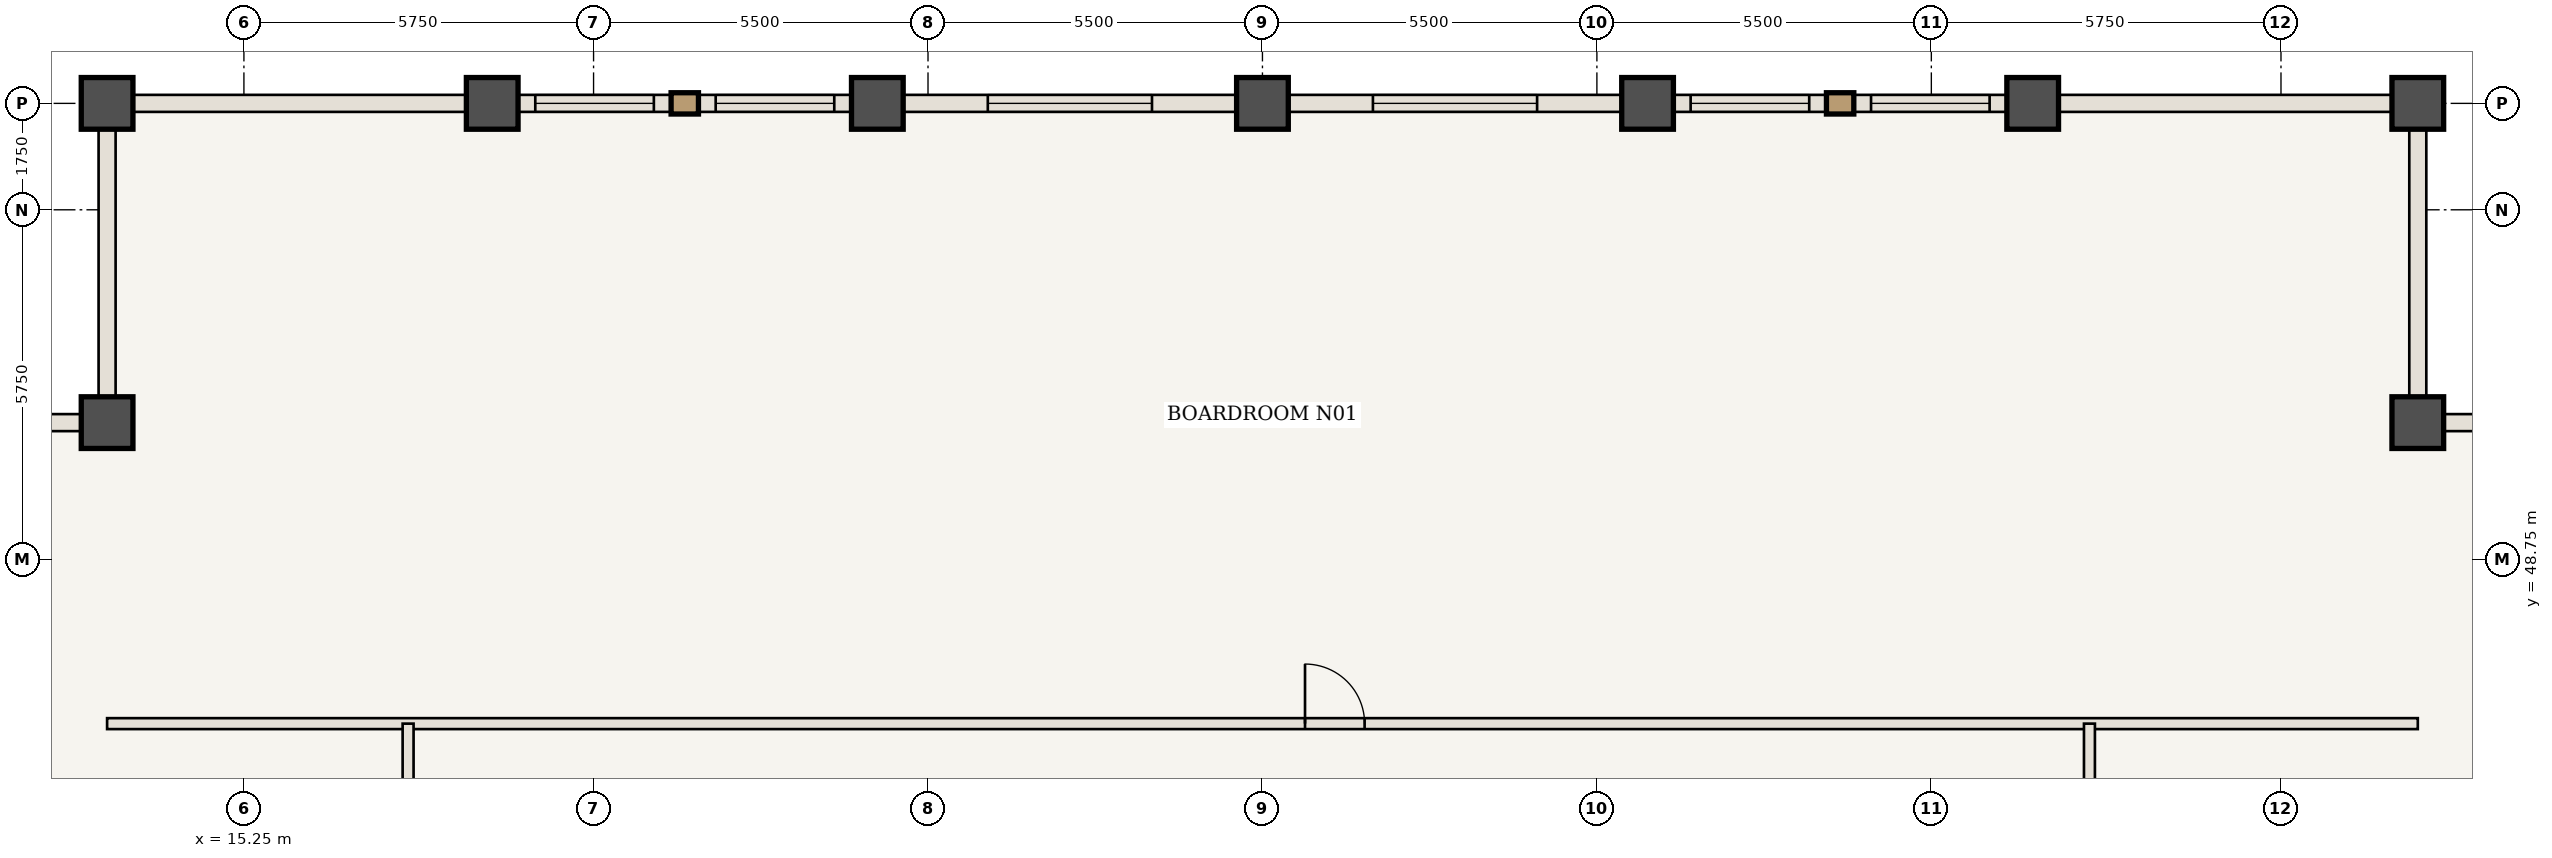
"""IFC4 building model, lengths in metres.
Left out: names, types, materials, properties, quantities, classifications, styles, units other than length and angle.
Written with IfcOpenShell. Run it as: python <this file> out.ifc"""

import sys

from ifc_helpers import new_model, si_unit, direction, frame, frame_2d, origin, origin_2d, place, context, subcontext, project, spatial, rectangle, extrude, element, fill, save


model = new_model("IFC4")
c1 = context("Model", 3, precision=1e-05, world=origin(), true_north=direction((0.0, 1.0)))
c2 = subcontext(c1, "Body", "Model", "MODEL_VIEW")
j1 = project(units=[si_unit("LENGTHUNIT", "METRE"), si_unit("PLANEANGLEUNIT", "RADIAN")], contexts=[c1])
p1 = place(None, origin())
s1 = spatial("IfcSite", under=j1, at=p1, CompositionType="ELEMENT")
p2 = place(p1, origin())
s2 = spatial("IfcBuilding", under=s1, at=p2, CompositionType="ELEMENT")
p3 = place(p2, frame((0.0, 0.0, 221.55)))
s3 = spatial("IfcBuildingStorey", under=s2, at=p3, CompositionType="ELEMENT", Elevation=221.55)
for number, where, z_axis, x_axis in (
    (1, (51.0, 51.0, 0.0), (0.0, 0.0, 1.0), (1.0, 0.0, 0.0)),
    (2, (51.0, 56.25, 0.0), (0.0, 0.0, 1.0), (1.0, 0.0, 0.0)),
    (3, (13.0, 56.25, 0.0), (0.0, 0.0, 1.0), (1.0, 0.0, 0.0)),
    (4, (13.0, 51.0, 0.0), (0.0, 0.0, 1.0), (1.0, 0.0, 0.0)),
    (5, (19.333, 56.25, 0.0), (0.0, 0.0, 1.0), (1.0, 0.0, 0.0)),
    (6, (25.667, 56.25, 0.0), (0.0, 0.0, 1.0), (1.0, 0.0, 0.0)),
    (7, (32.0, 56.25, 0.0), (0.0, 0.0, 1.0), (1.0, 0.0, 0.0)),
    (8, (38.333, 56.25, 0.0), (0.0, 0.0, 1.0), (1.0, 0.0, 0.0)),
    (9, (44.667, 56.25, 0.0), (0.0, 0.0, 1.0), (1.0, 0.0, 0.0)),
):
    element("IfcColumn", number, at=place(p3, frame(where, z_axis=z_axis, x_axis=x_axis)), inside=s3, PredefinedType="COLUMN", context=c2, shape_type="SweptSolid", body=[
        extrude(rectangle(XDim=0.85, YDim=0.85, at=origin_2d()), origin(), (0.0, 0.0, 1.0), 3.85),
    ])
p4 = place(p3, frame((13.0, 46.05, 0.0), z_axis=(0.0, 0.0, 1.0), x_axis=(1.0, 0.0, 0.0)))
e10 = element("IfcWall", 10, at=p4, inside=s3, PredefinedType="STANDARD", context=c2, shape_type="SweptSolid", body=[
    extrude(rectangle(XDim=38.0, YDim=0.18, at=frame_2d((19.0, 0.0))), origin(), (0.0, 0.0, 1.0), 3.685),
])
p5 = place(p4, frame((19.7, 0.0, 0.0)))
e11 = element("IfcOpeningElement", 11, at=p5, cuts=e10, PredefinedType="OPENING", context=c2, shape_type="SweptSolid", body=[
    extrude(rectangle(XDim=0.98, YDim=2.2, at=frame_2d((0.49, 1.1))), frame((0.0, 0.1, 0.0), z_axis=(0.0, -1.0, 0.0), x_axis=(1.0, 0.0, 0.0)), (0.0, 0.0, 1.0), 0.2),
])
p6 = place(p3, frame((17.95, 37.708, 0.0), z_axis=(0.0, 0.0, 1.0), x_axis=(0.0, 1.0, 0.0)))
e12 = element("IfcWall", 12, at=p6, inside=s3, PredefinedType="STANDARD", context=c2, shape_type="SweptSolid", body=[
    extrude(rectangle(XDim=8.342, YDim=0.18, at=frame_2d((4.171, 0.0))), origin(), (0.0, 0.0, 1.0), 3.685),
])
p7 = place(p6, frame((3.671, 0.0, 0.0)))
e13 = element("IfcOpeningElement", 13, at=p7, cuts=e12, PredefinedType="OPENING", context=c2, shape_type="SweptSolid", body=[
    extrude(rectangle(XDim=0.98, YDim=2.2, at=frame_2d((0.49, 1.1))), frame((0.0, 0.1, 0.0), z_axis=(0.0, -1.0, 0.0), x_axis=(1.0, 0.0, 0.0)), (0.0, 0.0, 1.0), 0.2),
])
p8 = place(p3, frame((45.6, 31.05, 0.0), z_axis=(0.0, 0.0, 1.0), x_axis=(0.0, 1.0, 0.0)))
e14 = element("IfcWall", 14, at=p8, inside=s3, PredefinedType="STANDARD", context=c2, shape_type="SweptSolid", body=[
    extrude(rectangle(XDim=15.0, YDim=0.18, at=frame_2d((7.5, 0.0))), origin(), (0.0, 0.0, 1.0), 3.685),
])
p9 = place(p8, frame((7.0, 0.0, 0.0)))
e15 = element("IfcOpeningElement", 15, at=p9, cuts=e14, PredefinedType="OPENING", context=c2, shape_type="SweptSolid", body=[
    extrude(rectangle(XDim=0.98, YDim=2.2, at=frame_2d((0.49, 1.1))), frame((0.0, 0.1, 0.0), z_axis=(0.0, -1.0, 0.0), x_axis=(1.0, 0.0, 0.0)), (0.0, 0.0, 1.0), 0.2),
])
p10 = place(p3, frame((13.0, 56.25, 0.0), z_axis=(0.0, 0.0, 1.0), x_axis=(1.0, 0.0, 0.0)))
e16 = element("IfcWall", 16, at=p10, inside=s3, PredefinedType="USERDEFINED", context=c2, shape_type="SweptSolid", body=[
    extrude(rectangle(XDim=6.333, YDim=0.28, at=frame_2d((3.167, 0.0))), origin(), (0.0, 0.0, 1.0), 2.985),
])
p11 = place(p3, frame((19.333, 56.25, 0.0), z_axis=(0.0, 0.0, 1.0), x_axis=(1.0, 0.0, 0.0)))
e17 = element("IfcWall", 17, at=p11, inside=s3, PredefinedType="USERDEFINED", context=c2, shape_type="SweptSolid", body=[
    extrude(rectangle(XDim=6.333, YDim=0.28, at=frame_2d((3.167, 0.0))), origin(), (0.0, 0.0, 1.0), 2.985),
])
p12 = place(p11, frame((0.708, 0.0, 0.85)))
e18 = element("IfcOpeningElement", 18, at=p12, cuts=e17, PredefinedType="OPENING", context=c2, shape_type="SweptSolid", body=[
    extrude(rectangle(XDim=1.95, YDim=1.935, at=frame_2d((0.975, 0.968))), frame((0.0, 0.15, 0.0), z_axis=(0.0, -1.0, 0.0), x_axis=(1.0, 0.0, 0.0)), (0.0, 0.0, 1.0), 0.3),
])
p13 = place(p11, frame((3.675, 0.0, 0.85)))
e19 = element("IfcOpeningElement", 19, at=p13, cuts=e17, PredefinedType="OPENING", context=c2, shape_type="SweptSolid", body=[
    extrude(rectangle(XDim=1.95, YDim=1.935, at=frame_2d((0.975, 0.968))), frame((0.0, 0.15, 0.0), z_axis=(0.0, -1.0, 0.0), x_axis=(1.0, 0.0, 0.0)), (0.0, 0.0, 1.0), 0.3),
])
p14 = place(p3, frame((25.667, 56.25, 0.0), z_axis=(0.0, 0.0, 1.0), x_axis=(1.0, 0.0, 0.0)))
e20 = element("IfcWall", 20, at=p14, inside=s3, PredefinedType="USERDEFINED", context=c2, shape_type="SweptSolid", body=[
    extrude(rectangle(XDim=6.333, YDim=0.28, at=frame_2d((3.167, 0.0))), origin(), (0.0, 0.0, 1.0), 2.985),
])
p15 = place(p14, frame((1.817, 0.0, 0.85)))
e21 = element("IfcOpeningElement", 21, at=p15, cuts=e20, PredefinedType="OPENING", context=c2, shape_type="SweptSolid", body=[
    extrude(rectangle(XDim=2.7, YDim=1.935, at=frame_2d((1.35, 0.968))), frame((0.0, 0.15, 0.0), z_axis=(0.0, -1.0, 0.0), x_axis=(1.0, 0.0, 0.0)), (0.0, 0.0, 1.0), 0.3),
])
p16 = place(p3, frame((32.0, 56.25, 0.0), z_axis=(0.0, 0.0, 1.0), x_axis=(1.0, 0.0, 0.0)))
e22 = element("IfcWall", 22, at=p16, inside=s3, PredefinedType="USERDEFINED", context=c2, shape_type="SweptSolid", body=[
    extrude(rectangle(XDim=6.333, YDim=0.28, at=frame_2d((3.167, 0.0))), origin(), (0.0, 0.0, 1.0), 2.985),
])
p17 = place(p16, frame((1.817, 0.0, 0.85)))
e23 = element("IfcOpeningElement", 23, at=p17, cuts=e22, PredefinedType="OPENING", context=c2, shape_type="SweptSolid", body=[
    extrude(rectangle(XDim=2.7, YDim=1.935, at=frame_2d((1.35, 0.968))), frame((0.0, 0.15, 0.0), z_axis=(0.0, -1.0, 0.0), x_axis=(1.0, 0.0, 0.0)), (0.0, 0.0, 1.0), 0.3),
])
p18 = place(p3, frame((38.333, 56.25, 0.0), z_axis=(0.0, 0.0, 1.0), x_axis=(1.0, 0.0, 0.0)))
e24 = element("IfcWall", 24, at=p18, inside=s3, PredefinedType="USERDEFINED", context=c2, shape_type="SweptSolid", body=[
    extrude(rectangle(XDim=6.333, YDim=0.28, at=frame_2d((3.167, 0.0))), origin(), (0.0, 0.0, 1.0), 2.985),
])
p19 = place(p18, frame((0.708, 0.0, 0.85)))
e25 = element("IfcOpeningElement", 25, at=p19, cuts=e24, PredefinedType="OPENING", context=c2, shape_type="SweptSolid", body=[
    extrude(rectangle(XDim=1.95, YDim=1.935, at=frame_2d((0.975, 0.968))), frame((0.0, 0.15, 0.0), z_axis=(0.0, -1.0, 0.0), x_axis=(1.0, 0.0, 0.0)), (0.0, 0.0, 1.0), 0.3),
])
p20 = place(p18, frame((3.675, 0.0, 0.85)))
e26 = element("IfcOpeningElement", 26, at=p20, cuts=e24, PredefinedType="OPENING", context=c2, shape_type="SweptSolid", body=[
    extrude(rectangle(XDim=1.95, YDim=1.935, at=frame_2d((0.975, 0.968))), frame((0.0, 0.15, 0.0), z_axis=(0.0, -1.0, 0.0), x_axis=(1.0, 0.0, 0.0)), (0.0, 0.0, 1.0), 0.3),
])
p21 = place(p3, frame((44.667, 56.25, 0.0), z_axis=(0.0, 0.0, 1.0), x_axis=(1.0, 0.0, 0.0)))
e27 = element("IfcWall", 27, at=p21, inside=s3, PredefinedType="USERDEFINED", context=c2, shape_type="SweptSolid", body=[
    extrude(rectangle(XDim=6.333, YDim=0.28, at=frame_2d((3.167, 0.0))), origin(), (0.0, 0.0, 1.0), 2.985),
])
for number, where, z_axis, x_axis in (
    (28, (51.0, 51.0, 0.0), (0.0, 0.0, 1.0), (1.0, 0.0, 0.0)),
    (29, (51.0, 56.25, 0.0), (0.0, 0.0, 1.0), (0.0, -1.0, 0.0)),
    (30, (13.0, 51.0, 0.0), (0.0, 0.0, 1.0), (0.0, 1.0, 0.0)),
    (31, (7.75, 51.0, 0.0), (0.0, 0.0, 1.0), (1.0, 0.0, 0.0)),
):
    element("IfcWall", number, at=place(p3, frame(where, z_axis=z_axis, x_axis=x_axis)), inside=s3, PredefinedType="USERDEFINED", context=c2, shape_type="SweptSolid", body=[
        extrude(rectangle(XDim=5.25, YDim=0.28, at=frame_2d((2.625, 0.0))), origin(), (0.0, 0.0, 1.0), 2.985),
    ])
p22 = place(p5, origin())
e32 = element("IfcDoor", 32, at=p22, inside=s3, OperationType="SINGLE_SWING_LEFT", PredefinedType="DOOR", context=c2, shape_type="SweptSolid", body=[
    extrude(rectangle(XDim=0.98, YDim=2.2, at=frame_2d((0.49, 1.1))), frame((0.0, 0.025, 0.0), z_axis=(0.0, -1.0, 0.0), x_axis=(1.0, 0.0, 0.0)), (0.0, 0.0, 1.0), 0.05),
])
fill(e11, e32)
p23 = place(p12, origin())
e33 = element("IfcWindow", 33, at=p23, inside=s3, PartitioningType="SINGLE_PANEL", PredefinedType="WINDOW", context=c2, shape_type="SweptSolid", body=[
    extrude(rectangle(XDim=1.95, YDim=1.935, at=frame_2d((0.975, 0.968))), frame((0.0, 0.03, 0.0), z_axis=(0.0, -1.0, 0.0), x_axis=(1.0, 0.0, 0.0)), (0.0, 0.0, 1.0), 0.06),
])
fill(e18, e33)
p24 = place(p13, origin())
e34 = element("IfcWindow", 34, at=p24, inside=s3, PartitioningType="SINGLE_PANEL", PredefinedType="WINDOW", context=c2, shape_type="SweptSolid", body=[
    extrude(rectangle(XDim=1.95, YDim=1.935, at=frame_2d((0.975, 0.968))), frame((0.0, 0.03, 0.0), z_axis=(0.0, -1.0, 0.0), x_axis=(1.0, 0.0, 0.0)), (0.0, 0.0, 1.0), 0.06),
])
fill(e19, e34)
p25 = place(p15, origin())
e35 = element("IfcWindow", 35, at=p25, inside=s3, PartitioningType="SINGLE_PANEL", PredefinedType="WINDOW", context=c2, shape_type="SweptSolid", body=[
    extrude(rectangle(XDim=2.7, YDim=1.935, at=frame_2d((1.35, 0.968))), frame((0.0, 0.03, 0.0), z_axis=(0.0, -1.0, 0.0), x_axis=(1.0, 0.0, 0.0)), (0.0, 0.0, 1.0), 0.06),
])
fill(e21, e35)
p26 = place(p17, origin())
e36 = element("IfcWindow", 36, at=p26, inside=s3, PartitioningType="SINGLE_PANEL", PredefinedType="WINDOW", context=c2, shape_type="SweptSolid", body=[
    extrude(rectangle(XDim=2.7, YDim=1.935, at=frame_2d((1.35, 0.968))), frame((0.0, 0.03, 0.0), z_axis=(0.0, -1.0, 0.0), x_axis=(1.0, 0.0, 0.0)), (0.0, 0.0, 1.0), 0.06),
])
fill(e23, e36)
p27 = place(p19, origin())
e37 = element("IfcWindow", 37, at=p27, inside=s3, PartitioningType="SINGLE_PANEL", PredefinedType="WINDOW", context=c2, shape_type="SweptSolid", body=[
    extrude(rectangle(XDim=1.95, YDim=1.935, at=frame_2d((0.975, 0.968))), frame((0.0, 0.03, 0.0), z_axis=(0.0, -1.0, 0.0), x_axis=(1.0, 0.0, 0.0)), (0.0, 0.0, 1.0), 0.06),
])
fill(e25, e37)
p28 = place(p20, origin())
e38 = element("IfcWindow", 38, at=p28, inside=s3, PartitioningType="SINGLE_PANEL", PredefinedType="WINDOW", context=c2, shape_type="SweptSolid", body=[
    extrude(rectangle(XDim=1.95, YDim=1.935, at=frame_2d((0.975, 0.968))), frame((0.0, 0.03, 0.0), z_axis=(0.0, -1.0, 0.0), x_axis=(1.0, 0.0, 0.0)), (0.0, 0.0, 1.0), 0.06),
])
fill(e26, e38)
save(model, sys.argv[1])
